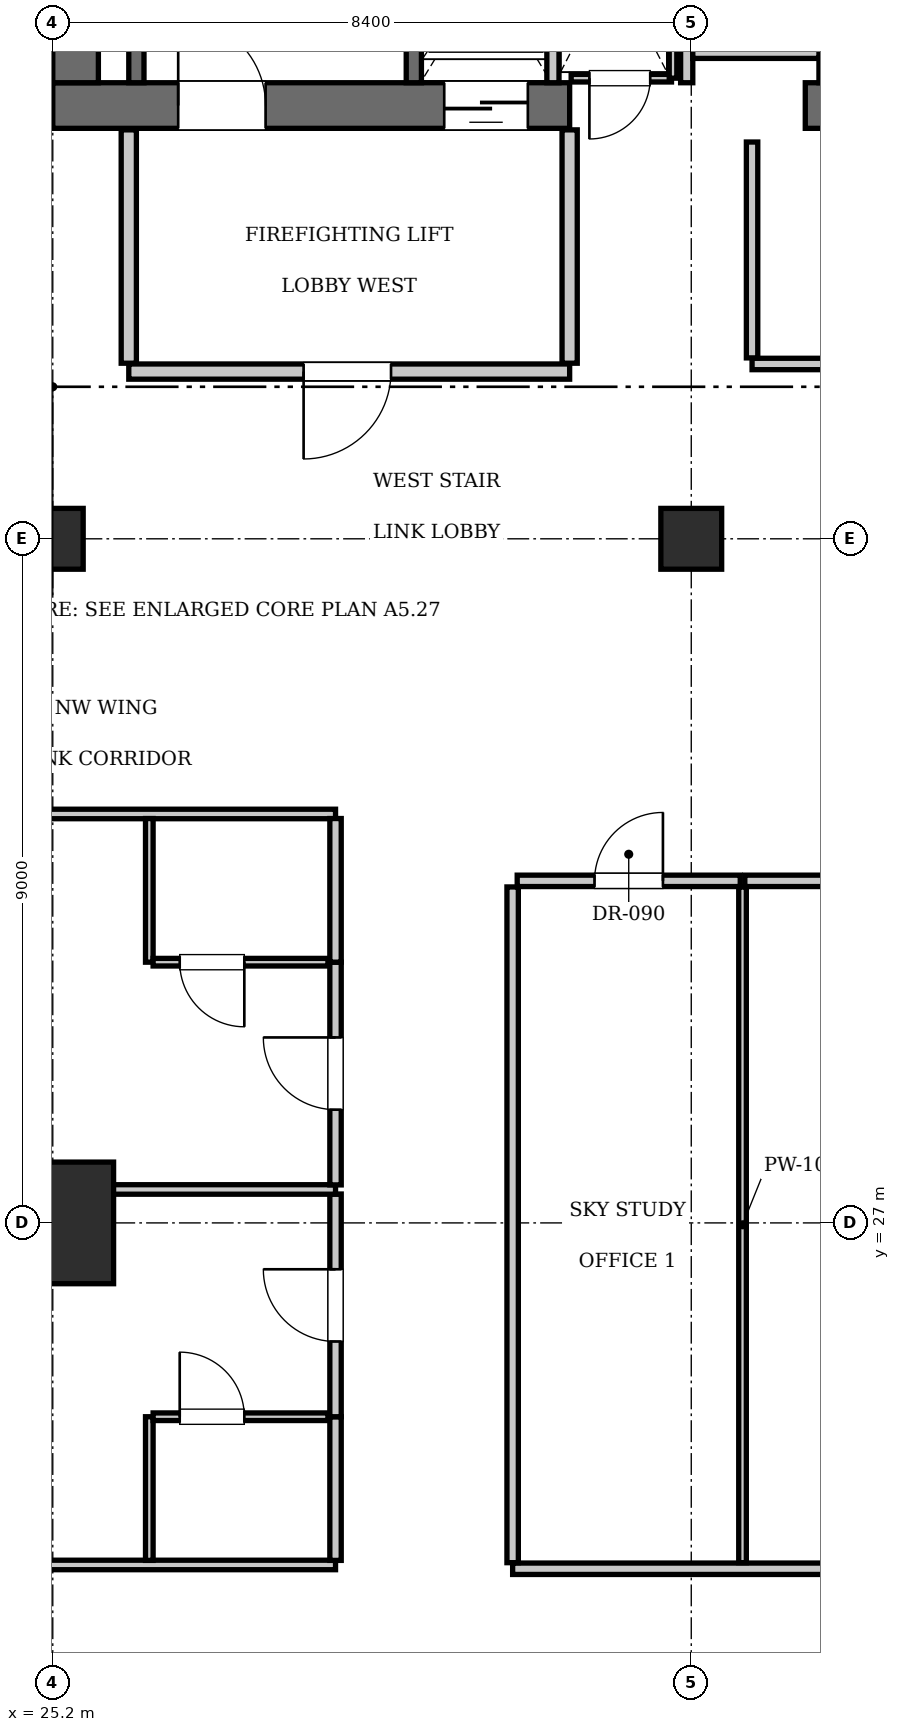
"""IFC4 building model, lengths in metres.
Left out: names, types, materials, properties, quantities, classifications, styles, units other than length and angle.
Written with IfcOpenShell. Run it as: python <this file> out.ifc"""

import sys

from ifc_helpers import new_model, si_unit, direction, frame, frame_2d, origin, origin_2d, place, context, subcontext, project, spatial, rectangle, extrude, element, fill, save


model = new_model("IFC4")
c1 = context("Model", 3, precision=1e-05, world=origin(), true_north=direction((0.0, 1.0)))
c2 = subcontext(c1, "Body", "Model", "MODEL_VIEW")
j1 = project(units=[si_unit("LENGTHUNIT", "METRE"), si_unit("PLANEANGLEUNIT", "RADIAN")], contexts=[c1])
p1 = place(None, origin())
s1 = spatial("IfcSite", under=j1, at=p1, CompositionType="ELEMENT")
p2 = place(p1, origin())
s2 = spatial("IfcBuilding", under=s1, at=p2, CompositionType="ELEMENT")
p3 = place(p2, frame((0.0, 0.0, 254.8)))
s3 = spatial("IfcBuildingStorey", under=s2, at=p3, CompositionType="ELEMENT", Elevation=254.8)
p4 = place(p3, frame((25.2, 27.0, 0.0), z_axis=(0.0, 0.0, 1.0), x_axis=(1.0, 0.0, 0.0)))
e1 = element("IfcColumn", 1, at=p4, inside=s3, PredefinedType="COLUMN", context=c2, shape_type="SweptSolid", body=[
    extrude(rectangle(XDim=1.6, YDim=1.6, at=origin_2d()), origin(), (0.0, 0.0, 1.0), 3.85),
])
p5 = place(p3, frame((25.2, 41.7, 0.0), z_axis=(0.0, 0.0, 1.0), x_axis=(1.0, 0.0, 0.0)))
e2 = element("IfcWall", 2, at=p5, inside=s3, PredefinedType="SHEAR", context=c2, shape_type="SweptSolid", body=[
    extrude(rectangle(XDim=6.8, YDim=0.6, at=frame_2d((3.4, 0.0))), origin(), (0.0, 0.0, 1.0), 3.85),
])
p6 = place(p5, frame((1.65, 0.0, 0.0)))
e3 = element("IfcOpeningElement", 3, at=p6, cuts=e2, PredefinedType="OPENING", context=c2, shape_type="SweptSolid", body=[
    extrude(rectangle(XDim=1.15, YDim=2.15, at=frame_2d((0.575, 1.075))), frame((0.0, 0.31, 0.0), z_axis=(0.0, -1.0, 0.0), x_axis=(1.0, 0.0, 0.0)), (0.0, 0.0, 1.0), 0.62),
])
p7 = place(p5, frame((5.15, 0.0, 0.0)))
e4 = element("IfcOpeningElement", 4, at=p7, cuts=e2, PredefinedType="OPENING", context=c2, shape_type="SweptSolid", body=[
    extrude(rectangle(XDim=1.1, YDim=2.2, at=frame_2d((0.55, 1.1))), frame((0.0, 0.31, 0.0), z_axis=(0.0, -1.0, 0.0), x_axis=(1.0, 0.0, 0.0)), (0.0, 0.0, 1.0), 0.62),
])
p8 = place(p3, frame((35.1, 41.7, 0.0), z_axis=(0.0, 0.0, 1.0), x_axis=(1.0, 0.0, 0.0)))
e5 = element("IfcWall", 5, at=p8, inside=s3, PredefinedType="SHEAR", context=c2, shape_type="SweptSolid", body=[
    extrude(rectangle(XDim=5.4, YDim=0.6, at=frame_2d((2.7, 0.0))), origin(), (0.0, 0.0, 1.0), 3.85),
])
p9 = place(p3, frame((25.5, 42.0, 0.0), z_axis=(0.0, 0.0, 1.0), x_axis=(0.0, 1.0, 0.0)))
e6 = element("IfcWall", 6, at=p9, inside=s3, PredefinedType="SHEAR", context=c2, shape_type="SweptSolid", body=[
    extrude(rectangle(XDim=2.2, YDim=0.6, at=frame_2d((1.1, 0.0))), origin(), (0.0, 0.0, 1.0), 3.85),
])
for number, where, z_axis, x_axis in (
    (7, (25.2, 36.0, 0.0), (0.0, 0.0, 1.0), (1.0, 0.0, 0.0)),
    (8, (33.6, 36.0, 0.0), (0.0, 0.0, 1.0), (1.0, 0.0, 0.0)),
):
    element("IfcColumn", number, at=place(p3, frame(where, z_axis=z_axis, x_axis=x_axis)), inside=s3, PredefinedType="COLUMN", context=c2, shape_type="SweptSolid", body=[
        extrude(rectangle(XDim=0.8, YDim=0.8, at=origin_2d()), origin(), (0.0, 0.0, 1.0), 3.85),
    ])
p10 = place(p3, frame((29.95, 42.0, 0.0), z_axis=(0.0, 0.0, 1.0), x_axis=(0.0, 1.0, 0.0)))
e9 = element("IfcWall", 9, at=p10, inside=s3, PredefinedType="SOLIDWALL", context=c2, shape_type="SweptSolid", body=[
    extrude(rectangle(XDim=9.15, YDim=0.2, at=frame_2d((4.575, 0.0))), origin(), (0.0, 0.0, 1.0), 3.61),
])
p11 = place(p3, frame((26.3, 42.0, 0.0), z_axis=(0.0, 0.0, 1.0), x_axis=(0.0, 1.0, 0.0)))
e10 = element("IfcWall", 10, at=p11, inside=s3, PredefinedType="SOLIDWALL", context=c2, shape_type="SweptSolid", body=[
    extrude(rectangle(XDim=9.12, YDim=0.2, at=frame_2d((4.56, 0.0))), origin(), (0.0, 0.0, 1.0), 3.61),
])
p12 = place(p3, frame((31.78, 42.0, 0.0), z_axis=(0.0, 0.0, 1.0), x_axis=(0.0, 1.0, 0.0)))
e11 = element("IfcWall", 11, at=p12, inside=s3, PredefinedType="SOLIDWALL", context=c2, shape_type="SweptSolid", body=[
    extrude(rectangle(XDim=2.74, YDim=0.16, at=frame_2d((1.37, 0.0))), origin(), (0.0, 0.0, 1.0), 3.61),
])
for number, where, z_axis, x_axis in (
    (12, (33.54, 42.0, 0.0), (0.0, 0.0, 1.0), (0.0, 1.0, 0.0)),
    (13, (35.36, 42.0, 0.0), (0.0, 0.0, 1.0), (0.0, 1.0, 0.0)),
):
    element("IfcWall", number, at=place(p3, frame(where, z_axis=z_axis, x_axis=x_axis)), inside=s3, PredefinedType="SOLIDWALL", context=c2, shape_type="SweptSolid", body=[
        extrude(rectangle(XDim=2.4, YDim=0.16, at=frame_2d((1.2, 0.0))), origin(), (0.0, 0.0, 1.0), 3.61),
    ])
p13 = place(p3, frame((33.62, 42.4, 0.0), z_axis=(0.0, 0.0, 1.0), x_axis=(1.0, 0.0, 0.0)))
e14 = element("IfcWall", 14, at=p13, inside=s3, PredefinedType="SOLIDWALL", context=c2, shape_type="SweptSolid", body=[
    extrude(rectangle(XDim=1.66, YDim=0.16, at=frame_2d((0.83, 0.0))), origin(), (0.0, 0.0, 1.0), 3.61),
])
p14 = place(p3, frame((26.2, 38.2, 0.0), z_axis=(0.0, 0.0, 1.0), x_axis=(1.0, 0.0, 0.0)))
e15 = element("IfcWall", 15, at=p14, inside=s3, PredefinedType="PARTITIONING", context=c2, shape_type="SweptSolid", body=[
    extrude(rectangle(XDim=5.8, YDim=0.2, at=frame_2d((2.9, 0.0))), origin(), (0.0, 0.0, 1.0), 3.61),
])
p15 = place(p14, frame((2.3, 0.0, 0.0)))
e16 = element("IfcOpeningElement", 16, at=p15, cuts=e15, PredefinedType="OPENING", context=c2, shape_type="SweptSolid", body=[
    extrude(rectangle(XDim=1.15, YDim=2.15, at=frame_2d((0.575, 1.075))), frame((0.0, 0.11, 0.0), z_axis=(0.0, -1.0, 0.0), x_axis=(1.0, 0.0, 0.0)), (0.0, 0.0, 1.0), 0.22),
])
for number, where, z_axis, x_axis in (
    (17, (26.2, 38.31, 0.0), (0.0, 0.0, 1.0), (0.0, 1.0, 0.0)),
    (18, (32.0, 38.31, 0.0), (0.0, 0.0, 1.0), (0.0, 1.0, 0.0)),
):
    element("IfcWall", number, at=place(p3, frame(where, z_axis=z_axis, x_axis=x_axis)), inside=s3, PredefinedType="PARTITIONING", context=c2, shape_type="SweptSolid", body=[
        extrude(rectangle(XDim=3.07, YDim=0.2, at=frame_2d((1.535, 0.0))), origin(), (0.0, 0.0, 1.0), 3.61),
    ])
p16 = place(p3, frame((32.02, 42.06, 0.0), z_axis=(0.0, 0.0, 1.0), x_axis=(1.0, 0.0, 0.0)))
e19 = element("IfcWall", 19, at=p16, inside=s3, PredefinedType="PARTITIONING", context=c2, shape_type="SweptSolid", body=[
    extrude(rectangle(XDim=1.32, YDim=0.1, at=frame_2d((0.66, 0.0))), origin(), (0.0, 0.0, 1.0), 3.61),
])
p17 = place(p16, frame((0.24, 0.0, 0.0)))
e20 = element("IfcOpeningElement", 20, at=p17, cuts=e19, PredefinedType="OPENING", context=c2, shape_type="SweptSolid", body=[
    extrude(rectangle(XDim=0.8, YDim=2.05, at=frame_2d((0.4, 1.025))), frame((0.0, 0.06, 0.0), z_axis=(0.0, -1.0, 0.0), x_axis=(1.0, 0.0, 0.0)), (0.0, 0.0, 1.0), 0.12),
])
p18 = place(p3, frame((33.36, 42.06, 0.0), z_axis=(0.0, 0.0, 1.0), x_axis=(0.0, 1.0, 0.0)))
e21 = element("IfcWall", 21, at=p18, inside=s3, PredefinedType="PARTITIONING", context=c2, shape_type="SweptSolid", body=[
    extrude(rectangle(XDim=2.88, YDim=0.1, at=frame_2d((1.44, 0.0))), origin(), (0.0, 0.0, 1.0), 3.61),
])
p19 = place(p3, frame((34.4, 38.3, 0.0), z_axis=(0.0, 0.0, 1.0), x_axis=(1.0, 0.0, 0.0)))
e22 = element("IfcWall", 22, at=p19, inside=s3, PredefinedType="PARTITIONING", context=c2, shape_type="SweptSolid", body=[
    extrude(rectangle(XDim=2.88, YDim=0.15, at=frame_2d((1.44, 0.0))), origin(), (0.0, 0.0, 1.0), 3.61),
])
p20 = place(p19, frame((1.0, 0.0, 0.0)))
e23 = element("IfcOpeningElement", 23, at=p20, cuts=e22, PredefinedType="OPENING", context=c2, shape_type="SweptSolid", body=[
    extrude(rectangle(XDim=0.8, YDim=2.05, at=frame_2d((0.4, 1.025))), frame((0.0, 0.085, 0.0), z_axis=(0.0, -1.0, 0.0), x_axis=(1.0, 0.0, 0.0)), (0.0, 0.0, 1.0), 0.17),
])
p21 = place(p3, frame((34.4, 38.38, 0.0), z_axis=(0.0, 0.0, 1.0), x_axis=(0.0, 1.0, 0.0)))
e24 = element("IfcWall", 24, at=p21, inside=s3, PredefinedType="PARTITIONING", context=c2, shape_type="SweptSolid", body=[
    extrude(rectangle(XDim=2.84, YDim=0.15, at=frame_2d((1.42, 0.0))), origin(), (0.0, 0.0, 1.0), 3.61),
])
p22 = place(p3, frame((31.25, 22.45, 0.0), z_axis=(0.0, 0.0, 1.0), x_axis=(1.0, 0.0, 0.0)))
e25 = element("IfcWall", 25, at=p22, inside=s3, PredefinedType="PARTITIONING", context=c2, shape_type="SweptSolid", body=[
    extrude(rectangle(XDim=13.15, YDim=0.15, at=frame_2d((6.575, 0.0))), origin(), (0.0, 0.0, 1.0), 3.61),
])
p23 = place(p3, frame((31.25, 22.53, 0.0), z_axis=(0.0, 0.0, 1.0), x_axis=(0.0, 1.0, 0.0)))
e26 = element("IfcWall", 26, at=p23, inside=s3, PredefinedType="PARTITIONING", context=c2, shape_type="SweptSolid", body=[
    extrude(rectangle(XDim=8.89, YDim=0.15, at=frame_2d((4.445, 0.0))), origin(), (0.0, 0.0, 1.0), 3.61),
])
p24 = place(p3, frame((31.31, 31.5, 0.0), z_axis=(0.0, 0.0, 1.0), x_axis=(1.0, 0.0, 0.0)))
e27 = element("IfcWall", 27, at=p24, inside=s3, PredefinedType="PARTITIONING", context=c2, shape_type="SweptSolid", body=[
    extrude(rectangle(XDim=2.934, YDim=0.15, at=frame_2d((1.467, 0.0))), origin(), (0.0, 0.0, 1.0), 3.61),
])
p25 = place(p24, frame((1.017, 0.0, 0.0)))
e28 = element("IfcOpeningElement", 28, at=p25, cuts=e27, PredefinedType="OPENING", context=c2, shape_type="SweptSolid", body=[
    extrude(rectangle(XDim=0.9, YDim=2.1, at=frame_2d((0.45, 1.05))), frame((0.0, 0.085, 0.0), z_axis=(0.0, -1.0, 0.0), x_axis=(1.0, 0.0, 0.0)), (0.0, 0.0, 1.0), 0.17),
])
p26 = place(p3, frame((34.274, 22.53, 0.0), z_axis=(0.0, 0.0, 1.0), x_axis=(0.0, 1.0, 0.0)))
e29 = element("IfcWall", 29, at=p26, inside=s3, PredefinedType="PARTITIONING", context=c2, shape_type="SweptSolid", body=[
    extrude(rectangle(XDim=8.89, YDim=0.1, at=frame_2d((4.445, 0.0))), origin(), (0.0, 0.0, 1.0), 3.61),
])
p27 = place(p3, frame((34.304, 31.5, 0.0), z_axis=(0.0, 0.0, 1.0), x_axis=(1.0, 0.0, 0.0)))
e30 = element("IfcWall", 30, at=p27, inside=s3, PredefinedType="PARTITIONING", context=c2, shape_type="SweptSolid", body=[
    extrude(rectangle(XDim=4.411, YDim=0.15, at=frame_2d((2.206, 0.0))), origin(), (0.0, 0.0, 1.0), 3.61),
])
p28 = place(p27, frame((1.756, 0.0, 0.0)))
e31 = element("IfcOpeningElement", 31, at=p28, cuts=e30, PredefinedType="OPENING", context=c2, shape_type="SweptSolid", body=[
    extrude(rectangle(XDim=0.9, YDim=2.1, at=frame_2d((0.45, 1.05))), frame((0.0, 0.085, 0.0), z_axis=(0.0, -1.0, 0.0), x_axis=(1.0, 0.0, 0.0)), (0.0, 0.0, 1.0), 0.17),
])
for number, where, z_axis, x_axis in (
    (32, (15.5, 22.5, 0.0), (0.0, 0.0, 1.0), (1.0, 0.0, 0.0)),
    (33, (15.5, 32.38, 0.0), (0.0, 0.0, 1.0), (1.0, 0.0, 0.0)),
):
    element("IfcWall", number, at=place(p3, frame(where, z_axis=z_axis, x_axis=x_axis)), inside=s3, PredefinedType="PARTITIONING", context=c2, shape_type="SweptSolid", body=[
        extrude(rectangle(XDim=13.42, YDim=0.125, at=frame_2d((6.71, 0.0))), origin(), (0.0, 0.0, 1.0), 3.61),
    ])
p29 = place(p3, frame((28.92, 22.56, 0.0), z_axis=(0.0, 0.0, 1.0), x_axis=(0.0, 1.0, 0.0)))
e34 = element("IfcWall", 34, at=p29, inside=s3, PredefinedType="PARTITIONING", context=c2, shape_type="SweptSolid", body=[
    extrude(rectangle(XDim=1.89, YDim=0.15, at=frame_2d((0.945, 0.0))), origin(), (0.0, 0.0, 1.0), 3.61),
])
p30 = place(p3, frame((28.92, 24.45, 0.0), z_axis=(0.0, 0.0, 1.0), x_axis=(0.0, 1.0, 0.0)))
e35 = element("IfcWall", 35, at=p30, inside=s3, PredefinedType="PARTITIONING", context=c2, shape_type="SweptSolid", body=[
    extrude(rectangle(XDim=2.93, YDim=0.15, at=frame_2d((1.465, 0.0))), origin(), (0.0, 0.0, 1.0), 3.61),
])
p31 = place(p30, frame((0.99, 0.0, 0.0)))
e36 = element("IfcOpeningElement", 36, at=p31, cuts=e35, PredefinedType="OPENING", context=c2, shape_type="SweptSolid", body=[
    extrude(rectangle(XDim=0.95, YDim=2.15, at=frame_2d((0.475, 1.075))), frame((0.0, 0.085, 0.0), z_axis=(0.0, -1.0, 0.0), x_axis=(1.0, 0.0, 0.0)), (0.0, 0.0, 1.0), 0.17),
])
p32 = place(p3, frame((26.47, 22.56, 0.0), z_axis=(0.0, 0.0, 1.0), x_axis=(0.0, 1.0, 0.0)))
e37 = element("IfcWall", 37, at=p32, inside=s3, PredefinedType="PARTITIONING", context=c2, shape_type="SweptSolid", body=[
    extrude(rectangle(XDim=1.89, YDim=0.1, at=frame_2d((0.945, 0.0))), origin(), (0.0, 0.0, 1.0), 3.61),
])
p33 = place(p3, frame((26.52, 24.45, 0.0), z_axis=(0.0, 0.0, 1.0), x_axis=(1.0, 0.0, 0.0)))
e38 = element("IfcWall", 38, at=p33, inside=s3, PredefinedType="PARTITIONING", context=c2, shape_type="SweptSolid", body=[
    extrude(rectangle(XDim=2.3, YDim=0.1, at=frame_2d((1.15, 0.0))), origin(), (0.0, 0.0, 1.0), 3.61),
])
p34 = place(p33, frame((0.35, 0.0, 0.0)))
e39 = element("IfcOpeningElement", 39, at=p34, cuts=e38, PredefinedType="OPENING", context=c2, shape_type="SweptSolid", body=[
    extrude(rectangle(XDim=0.85, YDim=2.1, at=frame_2d((0.425, 1.05))), frame((0.0, 0.06, 0.0), z_axis=(0.0, -1.0, 0.0), x_axis=(1.0, 0.0, 0.0)), (0.0, 0.0, 1.0), 0.12),
])
p35 = place(p3, frame((15.5, 27.44, 0.0), z_axis=(0.0, 0.0, 1.0), x_axis=(1.0, 0.0, 0.0)))
e40 = element("IfcWall", 40, at=p35, inside=s3, PredefinedType="PARTITIONING", context=c2, shape_type="SweptSolid", body=[
    extrude(rectangle(XDim=13.42, YDim=0.125, at=frame_2d((6.71, 0.0))), origin(), (0.0, 0.0, 1.0), 3.61),
])
p36 = place(p3, frame((28.92, 27.5, 0.0), z_axis=(0.0, 0.0, 1.0), x_axis=(0.0, 1.0, 0.0)))
e41 = element("IfcWall", 41, at=p36, inside=s3, PredefinedType="PARTITIONING", context=c2, shape_type="SweptSolid", body=[
    extrude(rectangle(XDim=2.93, YDim=0.15, at=frame_2d((1.465, 0.0))), origin(), (0.0, 0.0, 1.0), 3.61),
])
p37 = place(p36, frame((0.99, 0.0, 0.0)))
e42 = element("IfcOpeningElement", 42, at=p37, cuts=e41, PredefinedType="OPENING", context=c2, shape_type="SweptSolid", body=[
    extrude(rectangle(XDim=0.95, YDim=2.15, at=frame_2d((0.475, 1.075))), frame((0.0, 0.085, 0.0), z_axis=(0.0, -1.0, 0.0), x_axis=(1.0, 0.0, 0.0)), (0.0, 0.0, 1.0), 0.17),
])
p38 = place(p3, frame((28.92, 30.43, 0.0), z_axis=(0.0, 0.0, 1.0), x_axis=(0.0, 1.0, 0.0)))
e43 = element("IfcWall", 43, at=p38, inside=s3, PredefinedType="PARTITIONING", context=c2, shape_type="SweptSolid", body=[
    extrude(rectangle(XDim=1.89, YDim=0.15, at=frame_2d((0.945, 0.0))), origin(), (0.0, 0.0, 1.0), 3.61),
])
p39 = place(p3, frame((26.47, 30.43, 0.0), z_axis=(0.0, 0.0, 1.0), x_axis=(0.0, 1.0, 0.0)))
e44 = element("IfcWall", 44, at=p39, inside=s3, PredefinedType="PARTITIONING", context=c2, shape_type="SweptSolid", body=[
    extrude(rectangle(XDim=1.89, YDim=0.1, at=frame_2d((0.945, 0.0))), origin(), (0.0, 0.0, 1.0), 3.61),
])
p40 = place(p3, frame((26.52, 30.43, 0.0), z_axis=(0.0, 0.0, 1.0), x_axis=(1.0, 0.0, 0.0)))
e45 = element("IfcWall", 45, at=p40, inside=s3, PredefinedType="PARTITIONING", context=c2, shape_type="SweptSolid", body=[
    extrude(rectangle(XDim=2.3, YDim=0.1, at=frame_2d((1.15, 0.0))), origin(), (0.0, 0.0, 1.0), 3.61),
])
p41 = place(p40, frame((0.35, 0.0, 0.0)))
e46 = element("IfcOpeningElement", 46, at=p41, cuts=e45, PredefinedType="OPENING", context=c2, shape_type="SweptSolid", body=[
    extrude(rectangle(XDim=0.85, YDim=2.1, at=frame_2d((0.425, 1.05))), frame((0.0, 0.06, 0.0), z_axis=(0.0, -1.0, 0.0), x_axis=(1.0, 0.0, 0.0)), (0.0, 0.0, 1.0), 0.12),
])
p42 = place(p6, origin())
e47 = element("IfcDoor", 47, at=p42, inside=s3, OperationType="SINGLE_SWING_LEFT", PredefinedType="DOOR", context=c2, shape_type="SweptSolid", body=[
    extrude(rectangle(XDim=1.15, YDim=2.15, at=frame_2d((0.575, 1.075))), frame((0.0, 0.025, 0.0), z_axis=(0.0, -1.0, 0.0), x_axis=(1.0, 0.0, 0.0)), (0.0, 0.0, 1.0), 0.05),
])
fill(e3, e47)
p43 = place(p7, frame((1.1, 0.0, 0.0), z_axis=(0.0, 0.0, 1.0), x_axis=(-1.0, 0.0, 0.0)))
e48 = element("IfcDoor", 48, at=p43, inside=s3, OperationType="SLIDING_TO_LEFT", PredefinedType="DOOR", context=c2, shape_type="SweptSolid", body=[
    extrude(rectangle(XDim=1.1, YDim=2.2, at=frame_2d((0.55, 1.1))), frame((0.0, 0.025, 0.0), z_axis=(0.0, -1.0, 0.0), x_axis=(1.0, 0.0, 0.0)), (0.0, 0.0, 1.0), 0.05),
])
fill(e4, e48)
p44 = place(p15, frame((1.15, 0.0, 0.0), z_axis=(0.0, 0.0, 1.0), x_axis=(-1.0, 0.0, 0.0)))
e49 = element("IfcDoor", 49, at=p44, inside=s3, OperationType="SINGLE_SWING_RIGHT", PredefinedType="DOOR", context=c2, shape_type="SweptSolid", body=[
    extrude(rectangle(XDim=1.15, YDim=2.15, at=frame_2d((0.575, 1.075))), frame((0.0, 0.025, 0.0), z_axis=(0.0, -1.0, 0.0), x_axis=(1.0, 0.0, 0.0)), (0.0, 0.0, 1.0), 0.05),
])
fill(e16, e49)
p45 = place(p17, frame((0.8, 0.0, 0.0), z_axis=(0.0, 0.0, 1.0), x_axis=(-1.0, 0.0, 0.0)))
e50 = element("IfcDoor", 50, at=p45, inside=s3, OperationType="SINGLE_SWING_RIGHT", PredefinedType="DOOR", context=c2, shape_type="SweptSolid", body=[
    extrude(rectangle(XDim=0.8, YDim=2.05, at=frame_2d((0.4, 1.025))), frame((0.0, 0.025, 0.0), z_axis=(0.0, -1.0, 0.0), x_axis=(1.0, 0.0, 0.0)), (0.0, 0.0, 1.0), 0.05),
])
fill(e20, e50)
p46 = place(p25, origin())
e51 = element("IfcDoor", 51, at=p46, inside=s3, OperationType="SINGLE_SWING_RIGHT", PredefinedType="DOOR", context=c2, shape_type="SweptSolid", body=[
    extrude(rectangle(XDim=0.9, YDim=2.1, at=frame_2d((0.45, 1.05))), frame((0.0, 0.025, 0.0), z_axis=(0.0, -1.0, 0.0), x_axis=(1.0, 0.0, 0.0)), (0.0, 0.0, 1.0), 0.05),
])
fill(e28, e51)
p47 = place(p34, origin())
e52 = element("IfcDoor", 52, at=p47, inside=s3, OperationType="SINGLE_SWING_LEFT", PredefinedType="DOOR", context=c2, shape_type="SweptSolid", body=[
    extrude(rectangle(XDim=0.85, YDim=2.1, at=frame_2d((0.425, 1.05))), frame((0.0, 0.025, 0.0), z_axis=(0.0, -1.0, 0.0), x_axis=(1.0, 0.0, 0.0)), (0.0, 0.0, 1.0), 0.05),
])
fill(e39, e52)
p48 = place(p31, origin())
e53 = element("IfcDoor", 53, at=p48, inside=s3, OperationType="SINGLE_SWING_RIGHT", PredefinedType="DOOR", context=c2, shape_type="SweptSolid", body=[
    extrude(rectangle(XDim=0.95, YDim=2.15, at=frame_2d((0.475, 1.075))), frame((0.0, 0.025, 0.0), z_axis=(0.0, -1.0, 0.0), x_axis=(1.0, 0.0, 0.0)), (0.0, 0.0, 1.0), 0.05),
])
fill(e36, e53)
p49 = place(p41, frame((0.85, 0.0, 0.0), z_axis=(0.0, 0.0, 1.0), x_axis=(-1.0, 0.0, 0.0)))
e54 = element("IfcDoor", 54, at=p49, inside=s3, OperationType="SINGLE_SWING_LEFT", PredefinedType="DOOR", context=c2, shape_type="SweptSolid", body=[
    extrude(rectangle(XDim=0.85, YDim=2.1, at=frame_2d((0.425, 1.05))), frame((0.0, 0.025, 0.0), z_axis=(0.0, -1.0, 0.0), x_axis=(1.0, 0.0, 0.0)), (0.0, 0.0, 1.0), 0.05),
])
fill(e46, e54)
p50 = place(p37, origin())
e55 = element("IfcDoor", 55, at=p50, inside=s3, OperationType="SINGLE_SWING_RIGHT", PredefinedType="DOOR", context=c2, shape_type="SweptSolid", body=[
    extrude(rectangle(XDim=0.95, YDim=2.15, at=frame_2d((0.475, 1.075))), frame((0.0, 0.025, 0.0), z_axis=(0.0, -1.0, 0.0), x_axis=(1.0, 0.0, 0.0)), (0.0, 0.0, 1.0), 0.05),
])
fill(e42, e55)
save(model, sys.argv[1])
